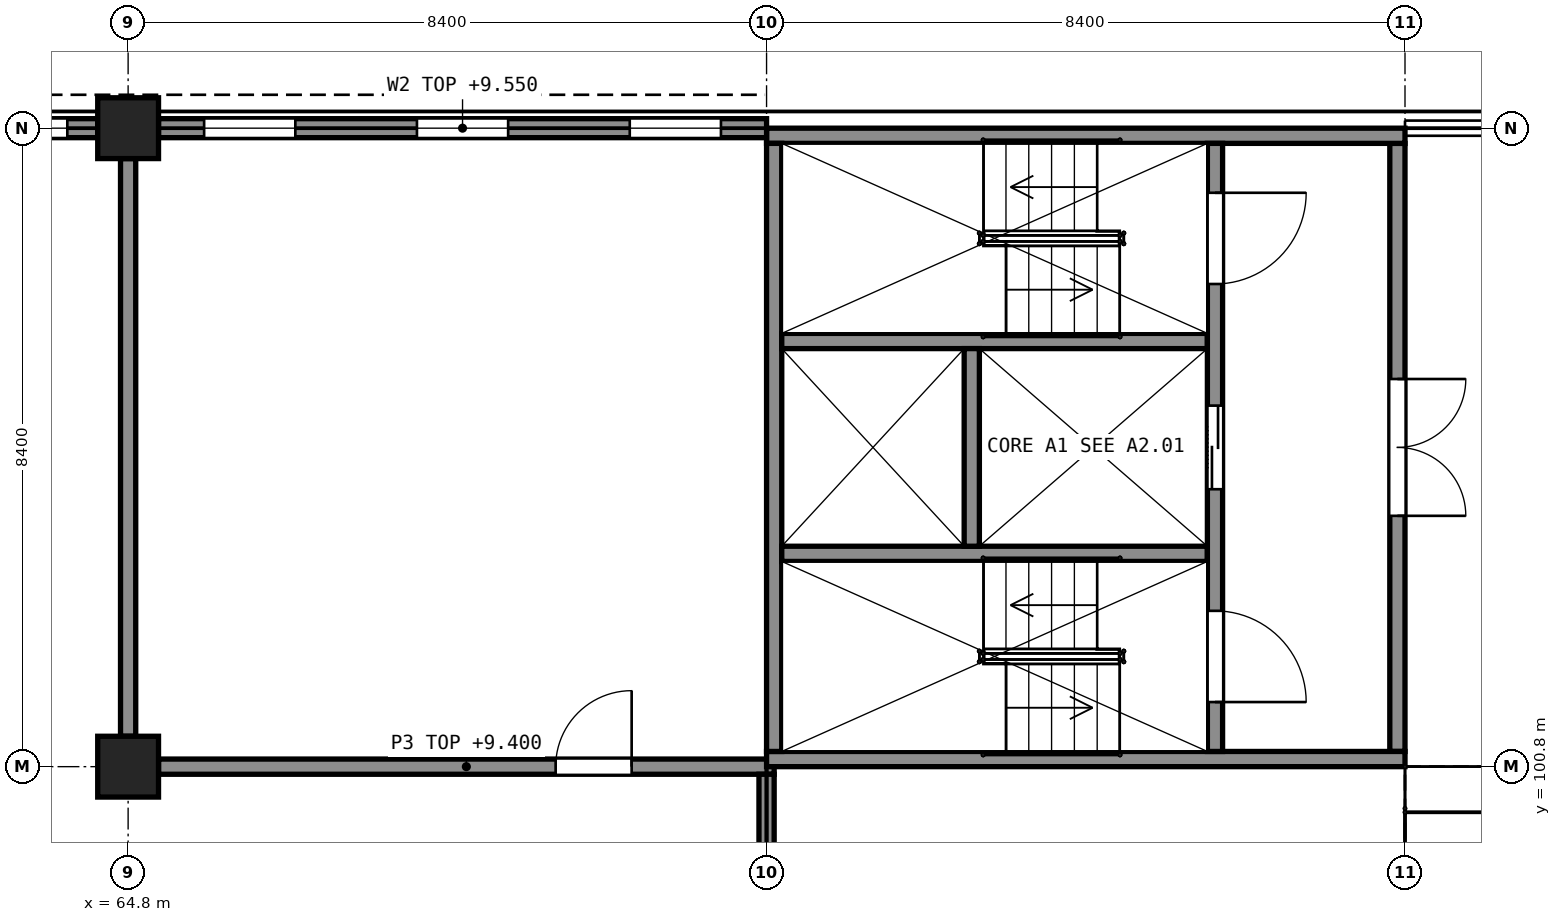
"""IFC4 building model, lengths in metres.
Left out: names, types, materials, properties, quantities, classifications, styles, units other than length and angle.
Written with IfcOpenShell. Run it as: python <this file> out.ifc"""

import sys

from ifc_helpers import new_model, si_unit, direction, frame, frame_2d, origin, origin_2d, place, context, subcontext, project, spatial, rectangle, extrude, element, fill, save


model = new_model("IFC4")
c1 = context("Model", 3, precision=1e-05, world=origin(), true_north=direction((0.0, 1.0)))
c2 = subcontext(c1, "Body", "Model", "MODEL_VIEW")
j1 = project(units=[si_unit("LENGTHUNIT", "METRE"), si_unit("PLANEANGLEUNIT", "RADIAN")], contexts=[c1])
p1 = place(None, origin())
s1 = spatial("IfcSite", under=j1, at=p1, CompositionType="ELEMENT")
p2 = place(p1, origin())
s2 = spatial("IfcBuilding", under=s1, at=p2, CompositionType="ELEMENT")
p3 = place(p2, frame((0.0, 0.0, 5.5)))
s3 = spatial("IfcBuildingStorey", under=s2, at=p3, CompositionType="ELEMENT", Elevation=5.5)
for number, where, z_axis, x_axis in (
    (1, (73.2, 100.9, 0.0), (0.0, 0.0, 1.0), (1.0, 0.0, 0.0)),
    (2, (73.2, 109.1, 0.0), (0.0, 0.0, 1.0), (1.0, 0.0, 0.0)),
):
    element("IfcWall", number, at=place(p3, frame(where, z_axis=z_axis, x_axis=x_axis)), inside=s3, PredefinedType="SHEAR", context=c2, shape_type="SweptSolid", body=[
        extrude(rectangle(XDim=8.4, YDim=0.2, at=frame_2d((4.2, 0.0))), origin(), (0.0, 0.0, 1.0), 5.0),
    ])
p4 = place(p3, frame((73.3, 101.0, 0.0), z_axis=(0.0, 0.0, 1.0), x_axis=(0.0, 1.0, 0.0)))
e3 = element("IfcWall", 3, at=p4, inside=s3, PredefinedType="SHEAR", context=c2, shape_type="SweptSolid", body=[
    extrude(rectangle(XDim=8.0, YDim=0.2, at=frame_2d((4.0, 0.0))), origin(), (0.0, 0.0, 1.0), 5.0),
])
p5 = place(p3, frame((81.5, 101.0, 0.0), z_axis=(0.0, 0.0, 1.0), x_axis=(0.0, 1.0, 0.0)))
e4 = element("IfcWall", 4, at=p5, inside=s3, PredefinedType="SHEAR", context=c2, shape_type="SweptSolid", body=[
    extrude(rectangle(XDim=8.0, YDim=0.2, at=frame_2d((4.0, 0.0))), origin(), (0.0, 0.0, 1.0), 5.0),
])
p6 = place(p5, frame((3.1, 0.0, 0.0)))
e5 = element("IfcOpeningElement", 5, at=p6, cuts=e4, PredefinedType="OPENING", context=c2, shape_type="SweptSolid", body=[
    extrude(rectangle(XDim=1.8, YDim=2.1, at=frame_2d((0.9, 1.05))), frame((0.0, 0.11, 0.0), z_axis=(0.0, -1.0, 0.0), x_axis=(1.0, 0.0, 0.0)), (0.0, 0.0, 1.0), 0.22),
])
p7 = place(p3, frame((79.1, 101.0, 0.0), z_axis=(0.0, 0.0, 1.0), x_axis=(0.0, 1.0, 0.0)))
e6 = element("IfcWall", 6, at=p7, inside=s3, PredefinedType="SHEAR", context=c2, shape_type="SweptSolid", body=[
    extrude(rectangle(XDim=8.0, YDim=0.2, at=frame_2d((4.0, 0.0))), origin(), (0.0, 0.0, 1.0), 5.0),
])
p8 = place(p7, frame((0.65, 0.0, 0.0)))
e7 = element("IfcOpeningElement", 7, at=p8, cuts=e6, PredefinedType="OPENING", context=c2, shape_type="SweptSolid", body=[
    extrude(rectangle(XDim=1.2, YDim=2.1, at=frame_2d((0.6, 1.05))), frame((0.0, 0.11, 0.0), z_axis=(0.0, -1.0, 0.0), x_axis=(1.0, 0.0, 0.0)), (0.0, 0.0, 1.0), 0.22),
])
p9 = place(p7, frame((6.15, 0.0, 0.0)))
e8 = element("IfcOpeningElement", 8, at=p9, cuts=e6, PredefinedType="OPENING", context=c2, shape_type="SweptSolid", body=[
    extrude(rectangle(XDim=1.2, YDim=2.1, at=frame_2d((0.6, 1.05))), frame((0.0, 0.11, 0.0), z_axis=(0.0, -1.0, 0.0), x_axis=(1.0, 0.0, 0.0)), (0.0, 0.0, 1.0), 0.22),
])
p10 = place(p7, frame((3.45, 0.0, 0.0)))
e9 = element("IfcOpeningElement", 9, at=p10, cuts=e6, PredefinedType="OPENING", context=c2, shape_type="SweptSolid", body=[
    extrude(rectangle(XDim=1.1, YDim=2.1, at=frame_2d((0.55, 1.05))), frame((0.0, 0.11, 0.0), z_axis=(0.0, -1.0, 0.0), x_axis=(1.0, 0.0, 0.0)), (0.0, 0.0, 1.0), 0.22),
])
for number, where, z_axis, x_axis in (
    (10, (73.4, 103.6, 0.0), (0.0, 0.0, 1.0), (1.0, 0.0, 0.0)),
    (11, (73.4, 106.4, 0.0), (0.0, 0.0, 1.0), (1.0, 0.0, 0.0)),
):
    element("IfcWall", number, at=place(p3, frame(where, z_axis=z_axis, x_axis=x_axis)), inside=s3, PredefinedType="SHEAR", context=c2, shape_type="SweptSolid", body=[
        extrude(rectangle(XDim=5.6, YDim=0.2, at=frame_2d((2.8, 0.0))), origin(), (0.0, 0.0, 1.0), 5.0),
    ])
p11 = place(p3, frame((75.9, 103.7, 0.0), z_axis=(0.0, 0.0, 1.0), x_axis=(0.0, 1.0, 0.0)))
e12 = element("IfcWall", 12, at=p11, inside=s3, PredefinedType="SHEAR", context=c2, shape_type="SweptSolid", body=[
    extrude(rectangle(XDim=2.6, YDim=0.2, at=frame_2d((1.3, 0.0))), origin(), (0.0, 0.0, 1.0), 5.0),
])
for number, where, z_axis, x_axis in (
    (13, (64.8, 100.8, 0.0), (0.0, 0.0, 1.0), (1.0, 0.0, 0.0)),
    (14, (64.8, 109.2, 0.0), (0.0, 0.0, 1.0), (1.0, 0.0, 0.0)),
):
    element("IfcColumn", number, at=place(p3, frame(where, z_axis=z_axis, x_axis=x_axis)), inside=s3, PredefinedType="COLUMN", context=c2, shape_type="SweptSolid", body=[
        extrude(rectangle(XDim=0.8, YDim=0.8, at=origin_2d()), origin(), (0.0, 0.0, 1.0), 5.0),
    ])
p12 = place(p3, frame((65.2, 109.2, 0.0), z_axis=(0.0, 0.0, 1.0), x_axis=(1.0, 0.0, 0.0)))
e15 = element("IfcWall", 15, at=p12, inside=s3, PredefinedType="SOLIDWALL", context=c2, shape_type="SweptSolid", body=[
    extrude(rectangle(XDim=8.0, YDim=0.25, at=frame_2d((4.0, 0.0))), origin(), (0.0, 0.0, 1.0), 4.05),
])
p13 = place(p12, frame((0.6, 0.0, 0.9)))
e16 = element("IfcOpeningElement", 16, at=p13, cuts=e15, PredefinedType="OPENING", context=c2, shape_type="SweptSolid", body=[
    extrude(rectangle(XDim=1.2, YDim=2.1, at=frame_2d((0.6, 1.05))), frame((0.0, 0.135, 0.0), z_axis=(0.0, -1.0, 0.0), x_axis=(1.0, 0.0, 0.0)), (0.0, 0.0, 1.0), 0.27),
])
p14 = place(p12, frame((3.4, 0.0, 0.9)))
e17 = element("IfcOpeningElement", 17, at=p14, cuts=e15, PredefinedType="OPENING", context=c2, shape_type="SweptSolid", body=[
    extrude(rectangle(XDim=1.2, YDim=2.1, at=frame_2d((0.6, 1.05))), frame((0.0, 0.135, 0.0), z_axis=(0.0, -1.0, 0.0), x_axis=(1.0, 0.0, 0.0)), (0.0, 0.0, 1.0), 0.27),
])
p15 = place(p12, frame((6.2, 0.0, 0.9)))
e18 = element("IfcOpeningElement", 18, at=p15, cuts=e15, PredefinedType="OPENING", context=c2, shape_type="SweptSolid", body=[
    extrude(rectangle(XDim=1.2, YDim=2.1, at=frame_2d((0.6, 1.05))), frame((0.0, 0.135, 0.0), z_axis=(0.0, -1.0, 0.0), x_axis=(1.0, 0.0, 0.0)), (0.0, 0.0, 1.0), 0.27),
])
p16 = place(p3, frame((56.8, 109.2, 0.0), z_axis=(0.0, 0.0, 1.0), x_axis=(1.0, 0.0, 0.0)))
e19 = element("IfcWall", 19, at=p16, inside=s3, PredefinedType="SOLIDWALL", context=c2, shape_type="SweptSolid", body=[
    extrude(rectangle(XDim=7.6, YDim=0.25, at=frame_2d((3.8, 0.0))), origin(), (0.0, 0.0, 1.0), 4.05),
])
p17 = place(p16, frame((0.4, 0.0, 0.9)))
e20 = element("IfcOpeningElement", 20, at=p17, cuts=e19, PredefinedType="OPENING", context=c2, shape_type="SweptSolid", body=[
    extrude(rectangle(XDim=1.2, YDim=2.1, at=frame_2d((0.6, 1.05))), frame((0.0, 0.135, 0.0), z_axis=(0.0, -1.0, 0.0), x_axis=(1.0, 0.0, 0.0)), (0.0, 0.0, 1.0), 0.27),
])
p18 = place(p16, frame((3.2, 0.0, 0.9)))
e21 = element("IfcOpeningElement", 21, at=p18, cuts=e19, PredefinedType="OPENING", context=c2, shape_type="SweptSolid", body=[
    extrude(rectangle(XDim=1.2, YDim=2.1, at=frame_2d((0.6, 1.05))), frame((0.0, 0.135, 0.0), z_axis=(0.0, -1.0, 0.0), x_axis=(1.0, 0.0, 0.0)), (0.0, 0.0, 1.0), 0.27),
])
p19 = place(p16, frame((6.0, 0.0, 0.9)))
e22 = element("IfcOpeningElement", 22, at=p19, cuts=e19, PredefinedType="OPENING", context=c2, shape_type="SweptSolid", body=[
    extrude(rectangle(XDim=1.2, YDim=2.1, at=frame_2d((0.6, 1.05))), frame((0.0, 0.135, 0.0), z_axis=(0.0, -1.0, 0.0), x_axis=(1.0, 0.0, 0.0)), (0.0, 0.0, 1.0), 0.27),
])
p20 = place(p3, frame((65.2, 100.8, 0.0), z_axis=(0.0, 0.0, 1.0), x_axis=(1.0, 0.0, 0.0)))
e23 = element("IfcWall", 23, at=p20, inside=s3, PredefinedType="PARTITIONING", context=c2, shape_type="SweptSolid", body=[
    extrude(rectangle(XDim=8.1, YDim=0.2, at=frame_2d((4.05, 0.0))), origin(), (0.0, 0.0, 1.0), 3.9),
])
p21 = place(p20, frame((5.225, 0.0, 0.0)))
e24 = element("IfcOpeningElement", 24, at=p21, cuts=e23, PredefinedType="OPENING", context=c2, shape_type="SweptSolid", body=[
    extrude(rectangle(XDim=1.0, YDim=2.1, at=frame_2d((0.5, 1.05))), frame((0.0, 0.11, 0.0), z_axis=(0.0, -1.0, 0.0), x_axis=(1.0, 0.0, 0.0)), (0.0, 0.0, 1.0), 0.22),
])
p22 = place(p3, frame((64.8, 101.2, 0.0), z_axis=(0.0, 0.0, 1.0), x_axis=(0.0, 1.0, 0.0)))
e25 = element("IfcWall", 25, at=p22, inside=s3, PredefinedType="PARTITIONING", context=c2, shape_type="SweptSolid", body=[
    extrude(rectangle(XDim=7.6, YDim=0.2, at=frame_2d((3.8, 0.0))), origin(), (0.0, 0.0, 1.0), 3.9),
])
p23 = place(p3, frame((73.2, 92.4, 0.0), z_axis=(0.0, 0.0, 1.0), x_axis=(0.0, 1.0, 0.0)))
e26 = element("IfcWall", 26, at=p23, inside=s3, PredefinedType="PARTITIONING", context=c2, shape_type="SweptSolid", body=[
    extrude(rectangle(XDim=8.3, YDim=0.2, at=frame_2d((4.15, 0.0))), origin(), (0.0, 0.0, 1.0), 3.9),
])
p24 = place(p13, origin())
e27 = element("IfcWindow", 27, at=p24, inside=s3, PartitioningType="SINGLE_PANEL", PredefinedType="WINDOW", context=c2, shape_type="SweptSolid", body=[
    extrude(rectangle(XDim=1.2, YDim=2.1, at=frame_2d((0.6, 1.05))), frame((0.0, -0.045, 0.0), z_axis=(0.0, -1.0, 0.0), x_axis=(1.0, 0.0, 0.0)), (0.0, 0.0, 1.0), 0.06),
])
fill(e16, e27)
p25 = place(p14, origin())
e28 = element("IfcWindow", 28, at=p25, inside=s3, PartitioningType="SINGLE_PANEL", PredefinedType="WINDOW", context=c2, shape_type="SweptSolid", body=[
    extrude(rectangle(XDim=1.2, YDim=2.1, at=frame_2d((0.6, 1.05))), frame((0.0, -0.045, 0.0), z_axis=(0.0, -1.0, 0.0), x_axis=(1.0, 0.0, 0.0)), (0.0, 0.0, 1.0), 0.06),
])
fill(e17, e28)
p26 = place(p15, origin())
e29 = element("IfcWindow", 29, at=p26, inside=s3, PartitioningType="SINGLE_PANEL", PredefinedType="WINDOW", context=c2, shape_type="SweptSolid", body=[
    extrude(rectangle(XDim=1.2, YDim=2.1, at=frame_2d((0.6, 1.05))), frame((0.0, -0.045, 0.0), z_axis=(0.0, -1.0, 0.0), x_axis=(1.0, 0.0, 0.0)), (0.0, 0.0, 1.0), 0.06),
])
fill(e18, e29)
p27 = place(p19, origin())
e30 = element("IfcWindow", 30, at=p27, inside=s3, PartitioningType="SINGLE_PANEL", PredefinedType="WINDOW", context=c2, shape_type="SweptSolid", body=[
    extrude(rectangle(XDim=1.2, YDim=2.1, at=frame_2d((0.6, 1.05))), frame((0.0, -0.045, 0.0), z_axis=(0.0, -1.0, 0.0), x_axis=(1.0, 0.0, 0.0)), (0.0, 0.0, 1.0), 0.06),
])
fill(e22, e30)
p28 = place(p21, origin())
e31 = element("IfcDoor", 31, at=p28, inside=s3, OperationType="SINGLE_SWING_LEFT", PredefinedType="DOOR", context=c2, shape_type="SweptSolid", body=[
    extrude(rectangle(XDim=1.0, YDim=2.1, at=frame_2d((0.5, 1.05))), frame((0.0, 0.025, 0.0), z_axis=(0.0, -1.0, 0.0), x_axis=(1.0, 0.0, 0.0)), (0.0, 0.0, 1.0), 0.05),
])
fill(e24, e31)
p29 = place(p6, origin())
e32 = element("IfcDoor", 32, at=p29, inside=s3, OperationType="DOUBLE_DOOR_SINGLE_SWING", PredefinedType="DOOR", context=c2, shape_type="SweptSolid", body=[
    extrude(rectangle(XDim=1.8, YDim=2.1, at=frame_2d((0.9, 1.05))), frame((0.0, 0.025, 0.0), z_axis=(0.0, -1.0, 0.0), x_axis=(1.0, 0.0, 0.0)), (0.0, 0.0, 1.0), 0.05),
])
fill(e5, e32)
p30 = place(p8, origin())
e33 = element("IfcDoor", 33, at=p30, inside=s3, OperationType="SINGLE_SWING_LEFT", PredefinedType="DOOR", context=c2, shape_type="SweptSolid", body=[
    extrude(rectangle(XDim=1.2, YDim=2.1, at=frame_2d((0.6, 1.05))), frame((0.0, 0.025, 0.0), z_axis=(0.0, -1.0, 0.0), x_axis=(1.0, 0.0, 0.0)), (0.0, 0.0, 1.0), 0.05),
])
fill(e7, e33)
p31 = place(p9, origin())
e34 = element("IfcDoor", 34, at=p31, inside=s3, OperationType="SINGLE_SWING_RIGHT", PredefinedType="DOOR", context=c2, shape_type="SweptSolid", body=[
    extrude(rectangle(XDim=1.2, YDim=2.1, at=frame_2d((0.6, 1.05))), frame((0.0, 0.025, 0.0), z_axis=(0.0, -1.0, 0.0), x_axis=(1.0, 0.0, 0.0)), (0.0, 0.0, 1.0), 0.05),
])
fill(e8, e34)
p32 = place(p10, origin())
e35 = element("IfcDoor", 35, at=p32, inside=s3, OperationType="DOUBLE_DOOR_SLIDING", PredefinedType="DOOR", context=c2, shape_type="SweptSolid", body=[
    extrude(rectangle(XDim=1.1, YDim=2.1, at=frame_2d((0.55, 1.05))), frame((0.0, 0.025, 0.0), z_axis=(0.0, -1.0, 0.0), x_axis=(1.0, 0.0, 0.0)), (0.0, 0.0, 1.0), 0.05),
])
fill(e9, e35)
save(model, sys.argv[1])
